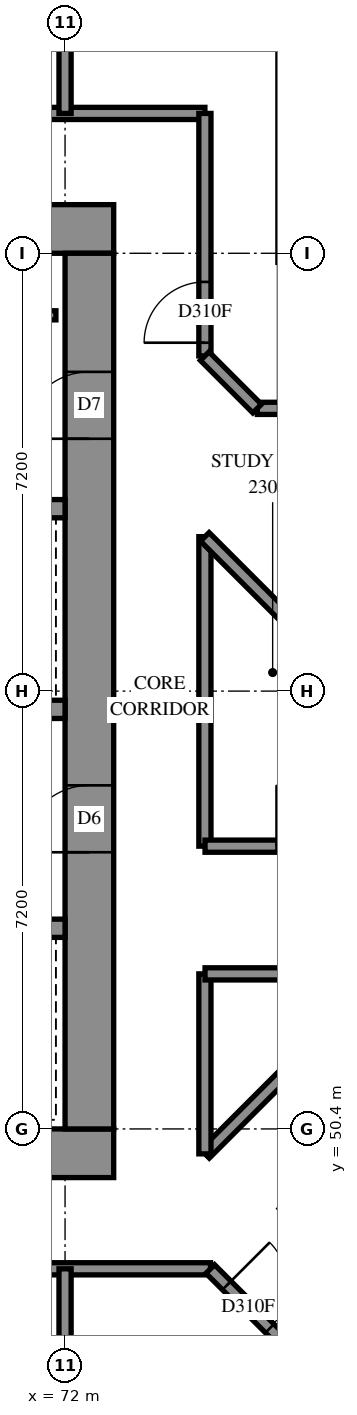
"""IFC4 building model, lengths in metres.
Left out: names, types, materials, properties, quantities, classifications, styles, units other than length and angle.
Written with IfcOpenShell. Run it as: python <this file> out.ifc"""

import sys

from ifc_helpers import new_model, si_unit, direction, frame, frame_2d, origin, place, context, subcontext, project, spatial, rectangle, extrude, element, fill, save


model = new_model("IFC4")
c1 = context("Model", 3, precision=1e-05, world=origin(), true_north=direction((0.0, 1.0)))
c2 = subcontext(c1, "Body", "Model", "MODEL_VIEW")
j1 = project(units=[si_unit("LENGTHUNIT", "METRE"), si_unit("PLANEANGLEUNIT", "RADIAN")], contexts=[c1])
p1 = place(None, origin())
s1 = spatial("IfcSite", under=j1, at=p1, CompositionType="ELEMENT")
p2 = place(p1, origin())
s2 = spatial("IfcBuilding", under=s1, at=p2, CompositionType="ELEMENT")
p3 = place(p2, frame((0.0, 0.0, 88.0)))
s3 = spatial("IfcBuildingStorey", under=s2, at=p3, CompositionType="ELEMENT", Elevation=88.0)
p4 = place(p3, frame((56.8, 50.0, -0.3), z_axis=(0.0, 0.0, 1.0), x_axis=(1.0, 0.0, 0.0)))
e1 = element("IfcWall", 1, at=p4, inside=s3, PredefinedType="SHEAR", context=c2, shape_type="SweptSolid", body=[
    extrude(rectangle(XDim=16.0, YDim=0.8, at=frame_2d((8.0, 0.0))), origin(), (0.0, 0.0, 1.0), 2.7),
])
p5 = place(p3, frame((56.8, 65.2, -0.3), z_axis=(0.0, 0.0, 1.0), x_axis=(1.0, 0.0, 0.0)))
e2 = element("IfcWall", 2, at=p5, inside=s3, PredefinedType="SHEAR", context=c2, shape_type="SweptSolid", body=[
    extrude(rectangle(XDim=16.0, YDim=0.8, at=frame_2d((8.0, 0.0))), origin(), (0.0, 0.0, 1.0), 2.7),
])
p6 = place(p5, frame((10.8, 0.0, 0.3)))
e3 = element("IfcOpeningElement", 3, at=p6, cuts=e2, PredefinedType="OPENING", context=c2, shape_type="SweptSolid", body=[
    extrude(rectangle(XDim=0.8, YDim=2.1, at=frame_2d((0.4, 1.05))), frame((0.0, 0.41, 0.0), z_axis=(0.0, -1.0, 0.0), x_axis=(1.0, 0.0, 0.0)), (0.0, 0.0, 1.0), 0.82),
])
p7 = place(p3, frame((72.4, 50.4, -0.3), z_axis=(0.0, 0.0, 1.0), x_axis=(0.0, 1.0, 0.0)))
e4 = element("IfcWall", 4, at=p7, inside=s3, PredefinedType="SHEAR", context=c2, shape_type="SweptSolid", body=[
    extrude(rectangle(XDim=14.4, YDim=0.8, at=frame_2d((7.2, 0.0))), origin(), (0.0, 0.0, 1.0), 2.7),
])
p8 = place(p7, frame((4.55, 0.0, 0.3)))
e5 = element("IfcOpeningElement", 5, at=p8, cuts=e4, PredefinedType="OPENING", context=c2, shape_type="SweptSolid", body=[
    extrude(rectangle(XDim=1.1, YDim=2.1, at=frame_2d((0.55, 1.05))), frame((0.0, 0.41, 0.0), z_axis=(0.0, -1.0, 0.0), x_axis=(1.0, 0.0, 0.0)), (0.0, 0.0, 1.0), 0.82),
])
p9 = place(p7, frame((11.35, 0.0, 0.3)))
e6 = element("IfcOpeningElement", 6, at=p9, cuts=e4, PredefinedType="OPENING", context=c2, shape_type="SweptSolid", body=[
    extrude(rectangle(XDim=1.1, YDim=2.1, at=frame_2d((0.55, 1.05))), frame((0.0, 0.41, 0.0), z_axis=(0.0, -1.0, 0.0), x_axis=(1.0, 0.0, 0.0)), (0.0, 0.0, 1.0), 0.82),
])
p10 = place(p3, frame((57.6, 53.7, 0.0), z_axis=(0.0, 0.0, 1.0), x_axis=(1.0, 0.0, 0.0)))
e7 = element("IfcWall", 7, at=p10, inside=s3, PredefinedType="SOLIDWALL", context=c2, shape_type="SweptSolid", body=[
    extrude(rectangle(XDim=14.4, YDim=0.3, at=frame_2d((7.2, 0.0))), origin(), (0.0, 0.0, 1.0), 3.1),
])
p11 = place(p10, frame((1.25, 0.0, 0.0)))
e8 = element("IfcOpeningElement", 8, at=p11, cuts=e7, PredefinedType="OPENING", context=c2, shape_type="SweptSolid", body=[
    extrude(rectangle(XDim=1.1, YDim=2.1, at=frame_2d((0.55, 1.05))), frame((0.0, 0.16, 0.0), z_axis=(0.0, -1.0, 0.0), x_axis=(1.0, 0.0, 0.0)), (0.0, 0.0, 1.0), 0.32),
])
p12 = place(p10, frame((4.85, 0.0, 0.0)))
e9 = element("IfcOpeningElement", 9, at=p12, cuts=e7, PredefinedType="OPENING", context=c2, shape_type="SweptSolid", body=[
    extrude(rectangle(XDim=1.1, YDim=2.1, at=frame_2d((0.55, 1.05))), frame((0.0, 0.16, 0.0), z_axis=(0.0, -1.0, 0.0), x_axis=(1.0, 0.0, 0.0)), (0.0, 0.0, 1.0), 0.32),
])
p13 = place(p10, frame((8.45, 0.0, 0.0)))
e10 = element("IfcOpeningElement", 10, at=p13, cuts=e7, PredefinedType="OPENING", context=c2, shape_type="SweptSolid", body=[
    extrude(rectangle(XDim=1.1, YDim=2.1, at=frame_2d((0.55, 1.05))), frame((0.0, 0.16, 0.0), z_axis=(0.0, -1.0, 0.0), x_axis=(1.0, 0.0, 0.0)), (0.0, 0.0, 1.0), 0.32),
])
p14 = place(p10, frame((12.05, 0.0, 0.0)))
e11 = element("IfcOpeningElement", 11, at=p14, cuts=e7, PredefinedType="OPENING", context=c2, shape_type="SweptSolid", body=[
    extrude(rectangle(XDim=1.1, YDim=2.1, at=frame_2d((0.55, 1.05))), frame((0.0, 0.16, 0.0), z_axis=(0.0, -1.0, 0.0), x_axis=(1.0, 0.0, 0.0)), (0.0, 0.0, 1.0), 0.32),
])
p15 = place(p3, frame((57.6, 57.3, 0.0), z_axis=(0.0, 0.0, 1.0), x_axis=(1.0, 0.0, 0.0)))
e12 = element("IfcWall", 12, at=p15, inside=s3, PredefinedType="SOLIDWALL", context=c2, shape_type="SweptSolid", body=[
    extrude(rectangle(XDim=14.4, YDim=0.3, at=frame_2d((7.2, 0.0))), origin(), (0.0, 0.0, 1.0), 3.1),
])
p16 = place(p15, frame((12.05, 0.0, 0.0)))
e13 = element("IfcOpeningElement", 13, at=p16, cuts=e12, PredefinedType="OPENING", context=c2, shape_type="SweptSolid", body=[
    extrude(rectangle(XDim=1.1, YDim=2.1, at=frame_2d((0.55, 1.05))), frame((0.0, 0.16, 0.0), z_axis=(0.0, -1.0, 0.0), x_axis=(1.0, 0.0, 0.0)), (0.0, 0.0, 1.0), 0.32),
])
p17 = place(p3, frame((64.8, 60.6, 0.0), z_axis=(0.0, 0.0, 1.0), x_axis=(1.0, 0.0, 0.0)))
e14 = element("IfcWall", 14, at=p17, inside=s3, PredefinedType="SOLIDWALL", context=c2, shape_type="SweptSolid", body=[
    extrude(rectangle(XDim=7.2, YDim=0.3, at=frame_2d((3.6, 0.0))), origin(), (0.0, 0.0, 1.0), 3.1),
])
p18 = place(p3, frame((64.95, 63.78, 0.0), z_axis=(0.0, 0.0, 1.0), x_axis=(1.0, 0.0, 0.0)))
e15 = element("IfcWall", 15, at=p18, inside=s3, PredefinedType="PARTITIONING", context=c2, shape_type="SweptSolid", body=[
    extrude(rectangle(XDim=6.9, YDim=0.15, at=frame_2d((3.45, 0.0))), origin(), (0.0, 0.0, 1.0), 3.1),
])
p19 = place(p3, frame((55.3, 48.1, 0.0), z_axis=(0.0, 0.0, 1.0), x_axis=(1.0, 0.0, 0.0)))
e16 = element("IfcWall", 16, at=p19, inside=s3, PredefinedType="PARTITIONING", context=c2, shape_type="SweptSolid", body=[
    extrude(rectangle(XDim=19.092, YDim=0.2, at=frame_2d((9.546, 0.0))), origin(), (0.0, 0.0, 1.0), 3.1),
])
p20 = place(p19, frame((6.199, 0.0, 0.0)))
e17 = element("IfcOpeningElement", 17, at=p20, cuts=e16, PredefinedType="OPENING", context=c2, shape_type="SweptSolid", body=[
    extrude(rectangle(XDim=0.9, YDim=2.1, at=frame_2d((0.45, 1.05))), frame((0.0, 0.11, 0.0), z_axis=(0.0, -1.0, 0.0), x_axis=(1.0, 0.0, 0.0)), (0.0, 0.0, 1.0), 0.22),
])
p21 = place(p19, frame((13.363, 0.0, 0.0)))
e18 = element("IfcOpeningElement", 18, at=p21, cuts=e16, PredefinedType="OPENING", context=c2, shape_type="SweptSolid", body=[
    extrude(rectangle(XDim=1.0, YDim=2.1, at=frame_2d((0.5, 1.05))), frame((0.0, 0.11, 0.0), z_axis=(0.0, -1.0, 0.0), x_axis=(1.0, 0.0, 0.0)), (0.0, 0.0, 1.0), 0.22),
])
p22 = place(p3, frame((55.3, 67.1, 0.0), z_axis=(0.0, 0.0, 1.0), x_axis=(1.0, 0.0, 0.0)))
e19 = element("IfcWall", 19, at=p22, inside=s3, PredefinedType="PARTITIONING", context=c2, shape_type="SweptSolid", body=[
    extrude(rectangle(XDim=19.0, YDim=0.2, at=frame_2d((9.5, 0.0))), origin(), (0.0, 0.0, 1.0), 3.1),
])
p23 = place(p22, frame((6.161, 0.0, 0.0)))
e20 = element("IfcOpeningElement", 20, at=p23, cuts=e19, PredefinedType="OPENING", context=c2, shape_type="SweptSolid", body=[
    extrude(rectangle(XDim=0.9, YDim=2.1, at=frame_2d((0.45, 1.05))), frame((0.0, 0.11, 0.0), z_axis=(0.0, -1.0, 0.0), x_axis=(1.0, 0.0, 0.0)), (0.0, 0.0, 1.0), 0.22),
])
p24 = place(p22, frame((13.386, 0.0, 0.0)))
e21 = element("IfcOpeningElement", 21, at=p24, cuts=e19, PredefinedType="OPENING", context=c2, shape_type="SweptSolid", body=[
    extrude(rectangle(XDim=1.0, YDim=2.1, at=frame_2d((0.5, 1.05))), frame((0.0, 0.11, 0.0), z_axis=(0.0, -1.0, 0.0), x_axis=(1.0, 0.0, 0.0)), (0.0, 0.0, 1.0), 0.22),
])
p25 = place(p3, frame((74.3, 55.05, 0.0), z_axis=(0.0, 0.0, 1.0), x_axis=(0.0, 1.0, 0.0)))
e22 = element("IfcWall", 22, at=p25, inside=s3, PredefinedType="PARTITIONING", context=c2, shape_type="SweptSolid", body=[
    extrude(rectangle(XDim=5.09, YDim=0.2, at=frame_2d((2.545, 0.0))), origin(), (0.0, 0.0, 1.0), 3.1),
])
p26 = place(p3, frame((74.302, 55.05, 0.0), z_axis=(0.0, 0.0, 1.0), x_axis=(1.0, 0.0, 0.0)))
e23 = element("IfcWall", 23, at=p26, inside=s3, PredefinedType="PARTITIONING", context=c2, shape_type="SweptSolid", body=[
    extrude(rectangle(XDim=5.088, YDim=0.2, at=frame_2d((2.544, 0.0))), origin(), (0.0, 0.0, 1.0), 3.1),
])
p27 = place(p26, frame((1.176, 0.0, 0.0)))
e24 = element("IfcOpeningElement", 24, at=p27, cuts=e23, PredefinedType="OPENING", context=c2, shape_type="SweptSolid", body=[
    extrude(rectangle(XDim=1.0, YDim=2.1, at=frame_2d((0.5, 1.05))), frame((0.0, 0.11, 0.0), z_axis=(0.0, -1.0, 0.0), x_axis=(1.0, 0.0, 0.0)), (0.0, 0.0, 1.0), 0.22),
])
p28 = place(p3, frame((74.388, 48.096, 0.0), z_axis=(0.0, 0.0, 1.0), x_axis=(0.7071067812, -0.7071067812, 0.0)))
e25 = element("IfcWall", 25, at=p28, inside=s3, PredefinedType="PARTITIONING", context=c2, shape_type="SweptSolid", body=[
    extrude(rectangle(XDim=4.452, YDim=0.2, at=frame_2d((2.226, 0.0))), origin(), (0.0, 0.0, 1.0), 3.1),
])
p29 = place(p28, frame((0.382, 0.0, 0.0)))
e26 = element("IfcOpeningElement", 26, at=p29, cuts=e25, PredefinedType="OPENING", context=c2, shape_type="SweptSolid", body=[
    extrude(rectangle(XDim=1.0, YDim=2.1, at=frame_2d((0.5, 1.05))), frame((0.0, 0.11, 0.0), z_axis=(0.0, -1.0, 0.0), x_axis=(1.0, 0.0, 0.0)), (0.0, 0.0, 1.0), 0.22),
])
p30 = place(p3, frame((74.299, 60.137, 0.0), z_axis=(0.0, 0.0, 1.0), x_axis=(0.7071067812, -0.7071067812, 0.0)))
e27 = element("IfcWall", 27, at=p30, inside=s3, PredefinedType="PARTITIONING", context=c2, shape_type="SweptSolid", body=[
    extrude(rectangle(XDim=4.452, YDim=0.2, at=frame_2d((2.226, 0.0))), origin(), (0.0, 0.0, 1.0), 3.1),
])
for number, where, z_axis, x_axis in (
    (28, (72.0, 67.1, 0.0), (0.0, 0.0, 1.0), (0.0, 1.0, 0.0)),
    (29, (72.0, 43.7, 0.0), (0.0, 0.0, 1.0), (0.0, 1.0, 0.0)),
):
    element("IfcWall", number, at=place(p3, frame(where, z_axis=z_axis, x_axis=x_axis)), inside=s3, PredefinedType="PARTITIONING", context=c2, shape_type="SweptSolid", body=[
        extrude(rectangle(XDim=4.4, YDim=0.2, at=frame_2d((2.2, 0.0))), origin(), (0.0, 0.0, 1.0), 3.1),
    ])
p31 = place(p3, frame((74.301, 49.991, 0.0), z_axis=(0.0, 0.0, 1.0), x_axis=(0.7071067812, 0.7071067812, 0.0)))
e30 = element("IfcWall", 30, at=p31, inside=s3, PredefinedType="PARTITIONING", context=c2, shape_type="SweptSolid", body=[
    extrude(rectangle(XDim=4.183, YDim=0.2, at=frame_2d((2.092, 0.0))), origin(), (0.0, 0.0, 1.0), 3.1),
])
p32 = place(p3, frame((75.162, 62.25, 0.0), z_axis=(0.0, 0.0, 1.0), x_axis=(1.0, 0.0, 0.0)))
e31 = element("IfcWall", 31, at=p32, inside=s3, PredefinedType="PARTITIONING", context=c2, shape_type="SweptSolid", body=[
    extrude(rectangle(XDim=4.038, YDim=0.2, at=frame_2d((2.019, 0.0))), origin(), (0.0, 0.0, 1.0), 3.1),
])
p33 = place(p32, frame((2.788, 0.0, 0.0)))
e32 = element("IfcOpeningElement", 32, at=p33, cuts=e31, PredefinedType="OPENING", context=c2, shape_type="SweptSolid", body=[
    extrude(rectangle(XDim=0.9, YDim=2.1, at=frame_2d((0.45, 1.05))), frame((0.0, 0.11, 0.0), z_axis=(0.0, -1.0, 0.0), x_axis=(1.0, 0.0, 0.0)), (0.0, 0.0, 1.0), 0.22),
])
p34 = place(p3, frame((74.3, 63.112, 0.0), z_axis=(0.0, 0.0, 1.0), x_axis=(0.0, 1.0, 0.0)))
e33 = element("IfcWall", 33, at=p34, inside=s3, PredefinedType="PARTITIONING", context=c2, shape_type="SweptSolid", body=[
    extrude(rectangle(XDim=3.988, YDim=0.2, at=frame_2d((1.994, 0.0))), origin(), (0.0, 0.0, 1.0), 3.1),
])
p35 = place(p34, frame((0.217, 0.0, 0.0)))
e34 = element("IfcOpeningElement", 34, at=p35, cuts=e33, PredefinedType="OPENING", context=c2, shape_type="SweptSolid", body=[
    extrude(rectangle(XDim=1.0, YDim=2.1, at=frame_2d((0.5, 1.05))), frame((0.0, 0.11, 0.0), z_axis=(0.0, -1.0, 0.0), x_axis=(1.0, 0.0, 0.0)), (0.0, 0.0, 1.0), 0.22),
])
p36 = place(p3, frame((74.3, 49.99, 0.0), z_axis=(0.0, 0.0, 1.0), x_axis=(0.0, 1.0, 0.0)))
e35 = element("IfcWall", 35, at=p36, inside=s3, PredefinedType="PARTITIONING", context=c2, shape_type="SweptSolid", body=[
    extrude(rectangle(XDim=2.96, YDim=0.2, at=frame_2d((1.48, 0.0))), origin(), (0.0, 0.0, 1.0), 3.1),
])
p37 = place(p3, frame((74.302, 52.95, 0.0), z_axis=(0.0, 0.0, 1.0), x_axis=(1.0, 0.0, 0.0)))
e36 = element("IfcWall", 36, at=p37, inside=s3, PredefinedType="PARTITIONING", context=c2, shape_type="SweptSolid", body=[
    extrude(rectangle(XDim=2.958, YDim=0.2, at=frame_2d((1.479, 0.0))), origin(), (0.0, 0.0, 1.0), 3.1),
])
p38 = place(p3, frame((74.296, 63.108, 0.0), z_axis=(0.0, 0.0, 1.0), x_axis=(0.7071067812, -0.7071067812, 0.0)))
e37 = element("IfcWall", 37, at=p38, inside=s3, PredefinedType="PARTITIONING", context=c2, shape_type="SweptSolid", body=[
    extrude(rectangle(XDim=1.219, YDim=0.2, at=frame_2d((0.61, 0.0))), origin(), (0.0, 0.0, 1.0), 3.1),
])
p39 = place(p8, origin())
e38 = element("IfcDoor", 38, at=p39, inside=s3, OperationType="DOUBLE_DOOR_SINGLE_SWING", PredefinedType="DOOR", context=c2, shape_type="SweptSolid", body=[
    extrude(rectangle(XDim=1.1, YDim=2.1, at=frame_2d((0.55, 1.05))), frame((0.0, 0.025, 0.0), z_axis=(0.0, -1.0, 0.0), x_axis=(1.0, 0.0, 0.0)), (0.0, 0.0, 1.0), 0.05),
])
fill(e5, e38)
p40 = place(p9, origin())
e39 = element("IfcDoor", 39, at=p40, inside=s3, OperationType="SINGLE_SWING_RIGHT", PredefinedType="DOOR", context=c2, shape_type="SweptSolid", body=[
    extrude(rectangle(XDim=1.1, YDim=2.1, at=frame_2d((0.55, 1.05))), frame((0.0, 0.025, 0.0), z_axis=(0.0, -1.0, 0.0), x_axis=(1.0, 0.0, 0.0)), (0.0, 0.0, 1.0), 0.05),
])
fill(e6, e39)
p41 = place(p35, origin())
e40 = element("IfcDoor", 40, at=p41, inside=s3, OperationType="SINGLE_SWING_RIGHT", PredefinedType="DOOR", context=c2, shape_type="SweptSolid", body=[
    extrude(rectangle(XDim=1.0, YDim=2.1, at=frame_2d((0.5, 1.05))), frame((0.0, 0.025, 0.0), z_axis=(0.0, -1.0, 0.0), x_axis=(1.0, 0.0, 0.0)), (0.0, 0.0, 1.0), 0.05),
])
fill(e34, e40)
p42 = place(p27, origin())
e41 = element("IfcDoor", 41, at=p42, inside=s3, OperationType="SINGLE_SWING_LEFT", PredefinedType="DOOR", context=c2, shape_type="SweptSolid", body=[
    extrude(rectangle(XDim=1.0, YDim=2.1, at=frame_2d((0.5, 1.05))), frame((0.0, 0.025, 0.0), z_axis=(0.0, -1.0, 0.0), x_axis=(1.0, 0.0, 0.0)), (0.0, 0.0, 1.0), 0.05),
])
fill(e24, e41)
p43 = place(p29, origin())
e42 = element("IfcDoor", 42, at=p43, inside=s3, OperationType="SINGLE_SWING_LEFT", PredefinedType="DOOR", context=c2, shape_type="SweptSolid", body=[
    extrude(rectangle(XDim=1.0, YDim=2.1, at=frame_2d((0.5, 1.05))), frame((0.0, 0.025, 0.0), z_axis=(0.0, -1.0, 0.0), x_axis=(1.0, 0.0, 0.0)), (0.0, 0.0, 1.0), 0.05),
])
fill(e26, e42)
save(model, sys.argv[1])
